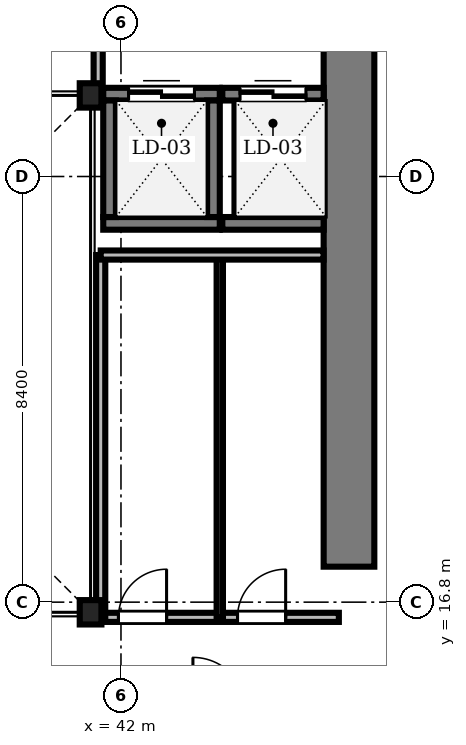
"""IFC4 building model, lengths in metres.
Left out: names, types, materials, properties, quantities, classifications, styles, units other than length and angle.
Written with IfcOpenShell. Run it as: python <this file> out.ifc"""

import sys

from ifc_helpers import new_model, si_unit, direction, frame, frame_2d, origin, origin_2d, place, context, subcontext, project, spatial, rectangle, i_section, extrude, source, transform, mapped, element, fill, save


model = new_model("IFC4")
c1 = context("Model", 3, precision=1e-05, world=origin(), true_north=direction((0.0, 1.0)))
c2 = subcontext(c1, "Body", "Model", "MODEL_VIEW")
j1 = project(units=[si_unit("LENGTHUNIT", "METRE"), si_unit("PLANEANGLEUNIT", "RADIAN")], contexts=[c1])
p1 = place(None, origin())
s1 = spatial("IfcSite", under=j1, at=p1, CompositionType="ELEMENT")
p2 = place(p1, origin())
s2 = spatial("IfcBuilding", under=s1, at=p2, CompositionType="ELEMENT")
p3 = place(p2, frame((0.0, 0.0, 31.25)))
s3 = spatial("IfcBuildingStorey", under=s2, at=p3, CompositionType="ELEMENT", Elevation=31.25)
m1 = source(origin(), c2, "Body", "SweptSolid", [
    extrude(rectangle(XDim=13.15, YDim=1.0, at=frame_2d((6.575, 0.0))), origin(), (0.0, 0.0, 1.0), 3.41),
])
p4 = place(p3, frame((46.5, 17.5, 0.0), z_axis=(0.0, 0.0, 1.0), x_axis=(0.0, 1.0, 0.0)))
e1 = element("IfcWall", 1, at=p4, inside=s3, PredefinedType="SHEAR", context=c2, shape_type="MappedRepresentation", body=[
    mapped(m1, transform((0.0, 0.0, 0.0), scale=1.0)),
])
m2 = source(origin(), c2, "Body", "SweptSolid", [
    extrude(i_section(OverallWidth=0.428, OverallDepth=0.481, WebThickness=0.04, FlangeThickness=0.063, FilletRadius=0.015, at=origin_2d()), origin(), (0.0, 0.0, 1.0), 3.41),
])
for number, where, z_axis, x_axis in (
    (2, (41.4, 16.6, 0.0), (0.0, 0.0, 1.0), (1.0, 0.0, 0.0)),
    (3, (41.4, 26.8, 0.0), (0.0, 0.0, 1.0), (1.0, 0.0, 0.0)),
):
    element("IfcColumn", number, at=place(p3, frame(where, z_axis=z_axis, x_axis=x_axis)), inside=s3, PredefinedType="COLUMN", context=c2, shape_type="MappedRepresentation", body=[
        mapped(m2, transform((0.0, 0.0, 0.0), scale=1.0)),
    ])
m3 = source(origin(), c2, "Body", "SweptSolid", [
    extrude(rectangle(XDim=2.3, YDim=0.25, at=frame_2d((1.15, 0.0))), origin(), (0.0, 0.0, 1.0), 3.41),
])
p5 = place(p3, frame((41.65, 24.275, 0.0), z_axis=(0.0, 0.0, 1.0), x_axis=(1.0, 0.0, 0.0)))
e4 = element("IfcWall", 4, at=p5, inside=s3, PredefinedType="SOLIDWALL", context=c2, shape_type="MappedRepresentation", body=[
    mapped(m3, transform((0.0, 0.0, 0.0), scale=1.0)),
])
p6 = place(p3, frame((41.65, 26.825, 0.0), z_axis=(0.0, 0.0, 1.0), x_axis=(1.0, 0.0, 0.0)))
e5 = element("IfcWall", 5, at=p6, inside=s3, PredefinedType="SOLIDWALL", context=c2, shape_type="MappedRepresentation", body=[
    mapped(m3, transform((0.0, 0.0, 0.0), scale=1.0)),
])
m4 = source(origin(), c2, "Body", "SweptSolid", [
    extrude(rectangle(XDim=1.3, YDim=2.3, at=frame_2d((0.65, 1.15))), frame((0.0, 0.135, 0.0), z_axis=(0.0, -1.0, 0.0), x_axis=(1.0, 0.0, 0.0)), (0.0, 0.0, 1.0), 0.27),
])
p7 = place(p6, frame((0.5, 0.0, 0.0)))
e6 = element("IfcOpeningElement", 6, at=p7, cuts=e5, PredefinedType="OPENING", context=c2, shape_type="MappedRepresentation", body=[
    mapped(m4, transform((0.0, 0.0, 0.0), scale=1.0)),
])
for number, where, z_axis, x_axis in (
    (7, (41.775, 24.4, 0.0), (0.0, 0.0, 1.0), (0.0, 1.0, 0.0)),
    (8, (43.825, 24.4, 0.0), (0.0, 0.0, 1.0), (0.0, 1.0, 0.0)),
):
    element("IfcWall", number, at=place(p3, frame(where, z_axis=z_axis, x_axis=x_axis)), inside=s3, PredefinedType="SOLIDWALL", context=c2, shape_type="MappedRepresentation", body=[
        mapped(m3, transform((0.0, 0.0, 0.0), scale=1.0)),
    ])
m5 = source(origin(), c2, "Body", "SweptSolid", [
    extrude(rectangle(XDim=2.0, YDim=0.25, at=frame_2d((1.0, 0.0))), origin(), (0.0, 0.0, 1.0), 3.41),
])
p8 = place(p3, frame((44.0, 24.275, 0.0), z_axis=(0.0, 0.0, 1.0), x_axis=(1.0, 0.0, 0.0)))
e9 = element("IfcWall", 9, at=p8, inside=s3, PredefinedType="SOLIDWALL", context=c2, shape_type="MappedRepresentation", body=[
    mapped(m5, transform((0.0, 0.0, 0.0), scale=1.0)),
])
p9 = place(p3, frame((44.0, 26.825, 0.0), z_axis=(0.0, 0.0, 1.0), x_axis=(1.0, 0.0, 0.0)))
e10 = element("IfcWall", 10, at=p9, inside=s3, PredefinedType="SOLIDWALL", context=c2, shape_type="MappedRepresentation", body=[
    mapped(m5, transform((0.0, 0.0, 0.0), scale=1.0)),
])
p10 = place(p9, frame((0.35, 0.0, 0.0)))
e11 = element("IfcOpeningElement", 11, at=p10, cuts=e10, PredefinedType="OPENING", context=c2, shape_type="MappedRepresentation", body=[
    mapped(m4, transform((0.0, 0.0, 0.0), scale=1.0)),
])
m6 = source(origin(), c2, "Body", "SweptSolid", [
    extrude(rectangle(XDim=4.7, YDim=0.18, at=frame_2d((2.35, 0.0))), origin(), (0.0, 0.0, 1.0), 2.802),
])
p11 = place(p3, frame((41.6, 16.5, 0.0), z_axis=(0.0, 0.0, 1.0), x_axis=(1.0, 0.0, 0.0)))
e12 = element("IfcWall", 12, at=p11, inside=s3, PredefinedType="PARTITIONING", context=c2, shape_type="MappedRepresentation", body=[
    mapped(m6, transform((0.0, 0.0, 0.0), scale=1.0)),
])
m7 = source(origin(), c2, "Body", "SweptSolid", [
    extrude(rectangle(XDim=0.95, YDim=2.15, at=frame_2d((0.475, 1.075))), frame((0.0, 0.1, 0.0), z_axis=(0.0, -1.0, 0.0), x_axis=(1.0, 0.0, 0.0)), (0.0, 0.0, 1.0), 0.2),
])
p12 = place(p11, frame((0.35, 0.0, 0.0)))
e13 = element("IfcOpeningElement", 13, at=p12, cuts=e12, PredefinedType="OPENING", context=c2, shape_type="MappedRepresentation", body=[
    mapped(m7, transform((0.0, 0.0, 0.0), scale=1.0)),
])
p13 = place(p11, frame((2.7, 0.0, 0.0)))
e14 = element("IfcOpeningElement", 14, at=p13, cuts=e12, PredefinedType="OPENING", context=c2, shape_type="MappedRepresentation", body=[
    mapped(m7, transform((0.0, 0.0, 0.0), scale=1.0)),
])
m8 = source(origin(), c2, "Body", "SweptSolid", [
    extrude(rectangle(XDim=7.15, YDim=0.18, at=frame_2d((3.575, 0.0))), origin(), (0.0, 0.0, 1.0), 2.802),
])
p14 = place(p3, frame((41.6, 16.5, 0.0), z_axis=(0.0, 0.0, 1.0), x_axis=(0.0, 1.0, 0.0)))
e15 = element("IfcWall", 15, at=p14, inside=s3, PredefinedType="PARTITIONING", context=c2, shape_type="MappedRepresentation", body=[
    mapped(m8, transform((0.0, 0.0, 0.0), scale=1.0)),
])
m9 = source(origin(), c2, "Body", "SweptSolid", [
    extrude(rectangle(XDim=7.15, YDim=0.125, at=frame_2d((3.575, 0.0))), origin(), (0.0, 0.0, 1.0), 2.802),
])
p15 = place(p3, frame((43.95, 16.5, 0.0), z_axis=(0.0, 0.0, 1.0), x_axis=(0.0, 1.0, 0.0)))
e16 = element("IfcWall", 16, at=p15, inside=s3, PredefinedType="PARTITIONING", context=c2, shape_type="MappedRepresentation", body=[
    mapped(m9, transform((0.0, 0.0, 0.0), scale=1.0)),
])
m10 = source(origin(), c2, "Body", "SweptSolid", [
    extrude(rectangle(XDim=4.398, YDim=0.18, at=frame_2d((2.199, 0.0))), origin(), (0.0, 0.0, 1.0), 3.41),
])
p16 = place(p3, frame((41.6, 23.65, 0.0), z_axis=(0.0, 0.0, 1.0), x_axis=(1.0, 0.0, 0.0)))
e17 = element("IfcWall", 17, at=p16, inside=s3, PredefinedType="PARTITIONING", context=c2, shape_type="MappedRepresentation", body=[
    mapped(m10, transform((0.0, 0.0, 0.0), scale=1.0)),
])
m11 = source(origin(), c2, "Body", "SweptSolid", [
    extrude(rectangle(XDim=2.35, YDim=0.18, at=frame_2d((1.175, 0.0))), origin(), (0.0, 0.0, 1.0), 2.802),
])
p17 = place(p3, frame((41.55, 26.8, 0.0), z_axis=(0.0, 0.0, 1.0), x_axis=(0.0, 1.0, 0.0)))
e18 = element("IfcWall", 18, at=p17, inside=s3, PredefinedType="PARTITIONING", context=c2, shape_type="MappedRepresentation", body=[
    mapped(m11, transform((0.0, 0.0, 0.0), scale=1.0)),
])
m12 = source(origin(), c2, "Body", "SweptSolid", [
    extrude(rectangle(XDim=1.3, YDim=2.3, at=frame_2d((0.65, 1.15))), frame((0.0, 0.025, 0.0), z_axis=(0.0, -1.0, 0.0), x_axis=(1.0, 0.0, 0.0)), (0.0, 0.0, 1.0), 0.05),
])
p18 = place(p7, origin())
e19 = element("IfcDoor", 19, at=p18, inside=s3, OperationType="DOUBLE_DOOR_SLIDING", PredefinedType="DOOR", context=c2, shape_type="MappedRepresentation", body=[
    mapped(m12, transform((0.0, 0.0, 0.0), scale=1.0)),
])
fill(e6, e19)
p19 = place(p10, origin())
e20 = element("IfcDoor", 20, at=p19, inside=s3, OperationType="DOUBLE_DOOR_SLIDING", PredefinedType="DOOR", context=c2, shape_type="MappedRepresentation", body=[
    mapped(m12, transform((0.0, 0.0, 0.0), scale=1.0)),
])
fill(e11, e20)
m13 = source(origin(), c2, "Body", "SweptSolid", [
    extrude(rectangle(XDim=0.95, YDim=2.15, at=frame_2d((0.475, 1.075))), frame((0.0, 0.025, 0.0), z_axis=(0.0, -1.0, 0.0), x_axis=(1.0, 0.0, 0.0)), (0.0, 0.0, 1.0), 0.05),
])
p20 = place(p12, origin())
e21 = element("IfcDoor", 21, at=p20, inside=s3, OperationType="SINGLE_SWING_RIGHT", PredefinedType="DOOR", context=c2, shape_type="MappedRepresentation", body=[
    mapped(m13, transform((0.0, 0.0, 0.0), scale=1.0)),
])
fill(e13, e21)
p21 = place(p13, origin())
e22 = element("IfcDoor", 22, at=p21, inside=s3, OperationType="SINGLE_SWING_RIGHT", PredefinedType="DOOR", context=c2, shape_type="MappedRepresentation", body=[
    mapped(m13, transform((0.0, 0.0, 0.0), scale=1.0)),
])
fill(e14, e22)
save(model, sys.argv[1])
